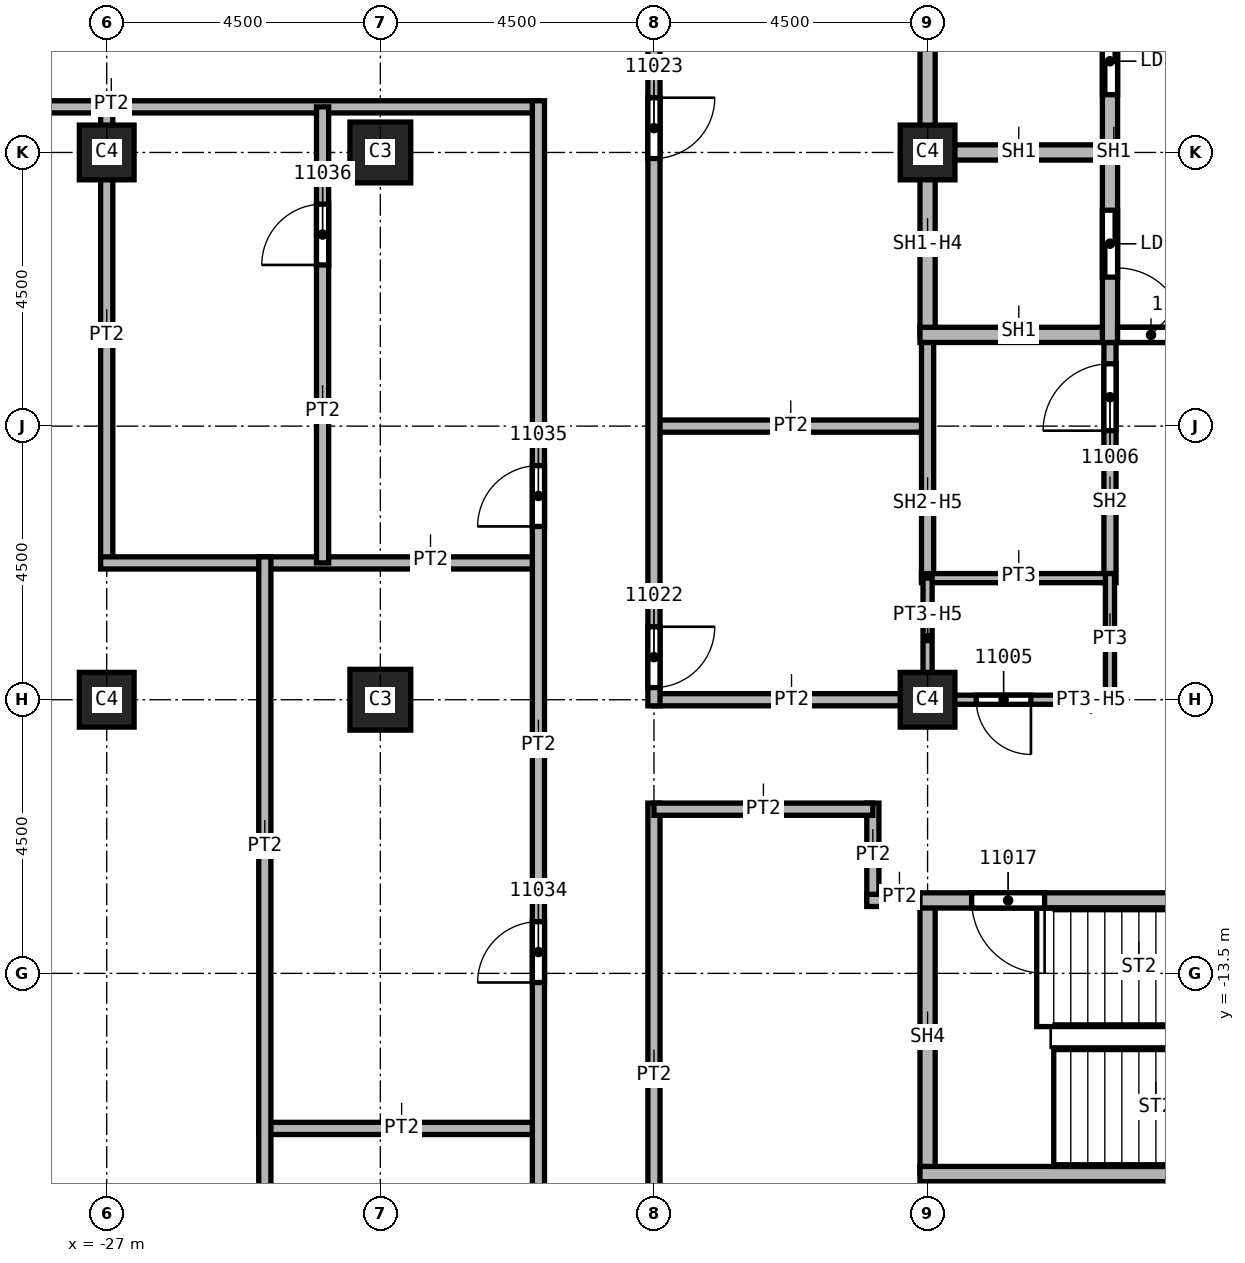
"""IFC4 building model, lengths in metres.
Left out: names, types, materials, properties, quantities, classifications, styles, units other than length and angle.
Written with IfcOpenShell. Run it as: python <this file> out.ifc"""

import sys

from ifc_helpers import new_model, si_unit, direction, frame, frame_2d, origin, origin_2d, place, context, subcontext, project, spatial, rectangle, extrude, element, fill, save


model = new_model("IFC4")
c1 = context("Model", 3, precision=1e-05, world=origin(), true_north=direction((0.0, 1.0)))
c2 = subcontext(c1, "Body", "Model", "MODEL_VIEW")
j1 = project(units=[si_unit("LENGTHUNIT", "METRE"), si_unit("PLANEANGLEUNIT", "RADIAN")], contexts=[c1])
p1 = place(None, origin())
s1 = spatial("IfcSite", under=j1, at=p1, CompositionType="ELEMENT")
p2 = place(p1, origin())
s2 = spatial("IfcBuilding", under=s1, at=p2, CompositionType="ELEMENT")
p3 = place(p2, frame((0.0, 0.0, 188.0)))
s3 = spatial("IfcBuildingStorey", under=s2, at=p3, CompositionType="ELEMENT", Elevation=188.0)
for number, where, z_axis, x_axis in (
    (1, (-22.5, 0.0, 0.0), (0.0, 0.0, 1.0), (1.0, 0.0, 0.0)),
    (2, (-22.5, -9.0, 0.0), (0.0, 0.0, 1.0), (1.0, 0.0, 0.0)),
):
    element("IfcColumn", number, at=place(p3, frame(where, z_axis=z_axis, x_axis=x_axis)), inside=s3, PredefinedType="COLUMN", context=c2, shape_type="SweptSolid", body=[
        extrude(rectangle(XDim=1.0, YDim=1.0, at=origin_2d()), origin(), (0.0, 0.0, 1.0), 3.72),
    ])
for number, where, z_axis, x_axis in (
    (3, (-13.5, 0.0, 0.0), (0.0, 0.0, 1.0), (1.0, 0.0, 0.0)),
    (4, (-13.5, -9.0, 0.0), (0.0, 0.0, 1.0), (1.0, 0.0, 0.0)),
    (5, (-27.0, 0.0, 0.0), (0.0, 0.0, 1.0), (1.0, 0.0, 0.0)),
    (6, (-27.0, -9.0, 0.0), (0.0, 0.0, 1.0), (1.0, 0.0, 0.0)),
):
    element("IfcColumn", number, at=place(p3, frame(where, z_axis=z_axis, x_axis=x_axis)), inside=s3, PredefinedType="COLUMN", context=c2, shape_type="SweptSolid", body=[
        extrude(rectangle(XDim=0.9, YDim=0.9, at=origin_2d()), origin(), (0.0, 0.0, 1.0), 3.72),
    ])
p4 = place(p3, frame((-27.0, -6.75, 0.0), z_axis=(0.0, 0.0, 1.0), x_axis=(0.0, 1.0, 0.0)))
e7 = element("IfcWall", 7, at=p4, inside=s3, PredefinedType="PARTITIONING", context=c2, shape_type="SweptSolid", body=[
    extrude(rectangle(XDim=7.5, YDim=0.2, at=frame_2d((3.75, 0.0))), origin(), (0.0, 0.0, 1.0), 3.72),
])
p5 = place(p3, frame((-19.9, 0.75, 0.0), z_axis=(0.0, 0.0, 1.0), x_axis=(-1.0, 0.0, 0.0)))
e8 = element("IfcWall", 8, at=p5, inside=s3, PredefinedType="PARTITIONING", context=c2, shape_type="SweptSolid", body=[
    extrude(rectangle(XDim=13.95, YDim=0.2, at=frame_2d((6.975, 0.0))), origin(), (0.0, 0.0, 1.0), 3.72),
])
p6 = place(p3, frame((-24.5, -16.05, 0.0), z_axis=(0.0, 0.0, 1.0), x_axis=(1.0, 0.0, 0.0)))
e9 = element("IfcWall", 9, at=p6, inside=s3, PredefinedType="PARTITIONING", context=c2, shape_type="SweptSolid", body=[
    extrude(rectangle(XDim=4.6, YDim=0.2, at=frame_2d((2.3, 0.0))), origin(), (0.0, 0.0, 1.0), 3.72),
])
p7 = place(p3, frame((-27.1, -6.75, 0.0), z_axis=(0.0, 0.0, 1.0), x_axis=(1.0, 0.0, 0.0)))
e10 = element("IfcWall", 10, at=p7, inside=s3, PredefinedType="PARTITIONING", context=c2, shape_type="SweptSolid", body=[
    extrude(rectangle(XDim=7.2, YDim=0.2, at=frame_2d((3.6, 0.0))), origin(), (0.0, 0.0, 1.0), 3.72),
])
p8 = place(p3, frame((-24.4, -17.5, 0.0), z_axis=(0.0, 0.0, 1.0), x_axis=(0.0, 1.0, 0.0)))
e11 = element("IfcWall", 11, at=p8, inside=s3, PredefinedType="PARTITIONING", context=c2, shape_type="SweptSolid", body=[
    extrude(rectangle(XDim=10.85, YDim=0.2, at=frame_2d((5.425, 0.0))), origin(), (0.0, 0.0, 1.0), 3.72),
])
p9 = place(p3, frame((-23.45, -6.75, 0.0), z_axis=(0.0, 0.0, 1.0), x_axis=(0.0, 1.0, 0.0)))
e12 = element("IfcWall", 12, at=p9, inside=s3, PredefinedType="PARTITIONING", context=c2, shape_type="SweptSolid", body=[
    extrude(rectangle(XDim=7.5, YDim=0.2, at=frame_2d((3.75, 0.0))), origin(), (0.0, 0.0, 1.0), 3.72),
])
p10 = place(p9, frame((4.9, 0.0, 0.0)))
e13 = element("IfcOpeningElement", 13, at=p10, cuts=e12, PredefinedType="OPENING", context=c2, shape_type="SweptSolid", body=[
    extrude(rectangle(XDim=1.0, YDim=2.1, at=frame_2d((0.5, 1.05))), frame((0.0, 0.1, 0.0), z_axis=(0.0, -1.0, 0.0), x_axis=(1.0, 0.0, 0.0)), (0.0, 0.0, 1.0), 0.2),
])
p11 = place(p3, frame((-19.9, -22.4, 0.0), z_axis=(0.0, 0.0, 1.0), x_axis=(0.0, 1.0, 0.0)))
e14 = element("IfcWall", 14, at=p11, inside=s3, PredefinedType="PARTITIONING", context=c2, shape_type="SweptSolid", body=[
    extrude(rectangle(XDim=23.25, YDim=0.2, at=frame_2d((11.625, 0.0))), origin(), (0.0, 0.0, 1.0), 3.72),
])
p12 = place(p11, frame((1.9, 0.0, 0.0)))
e15 = element("IfcOpeningElement", 15, at=p12, cuts=e14, PredefinedType="OPENING", context=c2, shape_type="SweptSolid", body=[
    extrude(rectangle(XDim=1.0, YDim=2.1, at=frame_2d((0.5, 1.05))), frame((0.0, 0.1, 0.0), z_axis=(0.0, -1.0, 0.0), x_axis=(1.0, 0.0, 0.0)), (0.0, 0.0, 1.0), 0.2),
])
p13 = place(p11, frame((8.75, 0.0, 0.0)))
e16 = element("IfcOpeningElement", 16, at=p13, cuts=e14, PredefinedType="OPENING", context=c2, shape_type="SweptSolid", body=[
    extrude(rectangle(XDim=1.0, YDim=2.1, at=frame_2d((0.5, 1.05))), frame((0.0, 0.1, 0.0), z_axis=(0.0, -1.0, 0.0), x_axis=(1.0, 0.0, 0.0)), (0.0, 0.0, 1.0), 0.2),
])
p14 = place(p11, frame((16.25, 0.0, 0.0)))
e17 = element("IfcOpeningElement", 17, at=p14, cuts=e14, PredefinedType="OPENING", context=c2, shape_type="SweptSolid", body=[
    extrude(rectangle(XDim=1.0, YDim=2.1, at=frame_2d((0.5, 1.05))), frame((0.0, 0.1, 0.0), z_axis=(0.0, -1.0, 0.0), x_axis=(1.0, 0.0, 0.0)), (0.0, 0.0, 1.0), 0.2),
])
p15 = place(p3, frame((-18.0, -10.7, 0.0), z_axis=(0.0, 0.0, 1.0), x_axis=(0.0, -1.0, 0.0)))
e18 = element("IfcWall", 18, at=p15, inside=s3, PredefinedType="PARTITIONING", context=c2, shape_type="SweptSolid", body=[
    extrude(rectangle(XDim=11.6, YDim=0.2, at=frame_2d((5.8, 0.0))), origin(), (0.0, 0.0, 1.0), 3.72),
])
p16 = place(p15, frame((8.75, 0.0, 0.0)))
e19 = element("IfcOpeningElement", 19, at=p16, cuts=e18, PredefinedType="OPENING", context=c2, shape_type="SweptSolid", body=[
    extrude(rectangle(XDim=1.0, YDim=2.1, at=frame_2d((0.5, 1.05))), frame((0.0, 0.1, 0.0), z_axis=(0.0, -1.0, 0.0), x_axis=(1.0, 0.0, 0.0)), (0.0, 0.0, 1.0), 0.2),
])
for number, where, z_axis, x_axis in (
    (20, (-18.0, -9.0, 0.0), (0.0, 0.0, 1.0), (1.0, 0.0, 0.0)),
    (21, (-18.0, -4.5, 0.0), (0.0, 0.0, 1.0), (1.0, 0.0, 0.0)),
):
    element("IfcWall", number, at=place(p3, frame(where, z_axis=z_axis, x_axis=x_axis)), inside=s3, PredefinedType="PARTITIONING", context=c2, shape_type="SweptSolid", body=[
        extrude(rectangle(XDim=4.5, YDim=0.2, at=frame_2d((2.25, 0.0))), origin(), (0.0, 0.0, 1.0), 3.72),
    ])
p17 = place(p3, frame((-18.0, 9.1, 0.0), z_axis=(0.0, 0.0, 1.0), x_axis=(0.0, -1.0, 0.0)))
e22 = element("IfcWall", 22, at=p17, inside=s3, PredefinedType="PARTITIONING", context=c2, shape_type="SweptSolid", body=[
    extrude(rectangle(XDim=18.2, YDim=0.2, at=frame_2d((9.1, 0.0))), origin(), (0.0, 0.0, 1.0), 3.72),
])
p18 = place(p17, frame((16.9, 0.0, 0.0)))
e23 = element("IfcOpeningElement", 23, at=p18, cuts=e22, PredefinedType="OPENING", context=c2, shape_type="SweptSolid", body=[
    extrude(rectangle(XDim=1.0, YDim=2.1, at=frame_2d((0.5, 1.05))), frame((0.0, 0.1, 0.0), z_axis=(0.0, -1.0, 0.0), x_axis=(1.0, 0.0, 0.0)), (0.0, 0.0, 1.0), 0.2),
])
p19 = place(p17, frame((8.2, 0.0, 0.0)))
e24 = element("IfcOpeningElement", 24, at=p19, cuts=e22, PredefinedType="OPENING", context=c2, shape_type="SweptSolid", body=[
    extrude(rectangle(XDim=1.0, YDim=2.1, at=frame_2d((0.5, 1.05))), frame((0.0, 0.1, 0.0), z_axis=(0.0, -1.0, 0.0), x_axis=(1.0, 0.0, 0.0)), (0.0, 0.0, 1.0), 0.2),
])
p20 = place(p3, frame((-14.4, -12.3, 0.0), z_axis=(0.0, 0.0, 1.0), x_axis=(0.0, 1.0, 0.0)))
e25 = element("IfcWall", 25, at=p20, inside=s3, PredefinedType="PARTITIONING", context=c2, shape_type="SweptSolid", body=[
    extrude(rectangle(XDim=1.6, YDim=0.2, at=frame_2d((0.8, 0.0))), origin(), (0.0, 0.0, 1.0), 3.72),
])
p21 = place(p3, frame((-14.4, -10.8, 0.0), z_axis=(0.0, 0.0, 1.0), x_axis=(-1.0, 0.0, 0.0)))
e26 = element("IfcWall", 26, at=p21, inside=s3, PredefinedType="PARTITIONING", context=c2, shape_type="SweptSolid", body=[
    extrude(rectangle(XDim=3.6, YDim=0.2, at=frame_2d((1.8, 0.0))), origin(), (0.0, 0.0, 1.0), 3.72),
])
p22 = place(p3, frame((-13.375, -12.3, 0.0), z_axis=(0.0, 0.0, 1.0), x_axis=(-1.0, 0.0, 0.0)))
e27 = element("IfcWall", 27, at=p22, inside=s3, PredefinedType="PARTITIONING", context=c2, shape_type="SweptSolid", body=[
    extrude(rectangle(XDim=1.125, YDim=0.2, at=frame_2d((0.562, 0.0))), origin(), (0.0, 0.0, 1.0), 3.72),
])
p23 = place(p3, frame((-13.5, -7.0, 0.0), z_axis=(0.0, 0.0, 1.0), x_axis=(0.0, 1.0, 0.0)))
e28 = element("IfcWall", 28, at=p23, inside=s3, PredefinedType="SOLIDWALL", context=c2, shape_type="SweptSolid", body=[
    extrude(rectangle(XDim=4.0, YDim=0.2, at=frame_2d((2.0, 0.0))), origin(), (0.0, 0.0, 1.0), 2.958),
])
p24 = place(p3, frame((-10.5, -7.075, 0.0), z_axis=(0.0, 0.0, 1.0), x_axis=(0.0, 1.0, 0.0)))
e29 = element("IfcWall", 29, at=p24, inside=s3, PredefinedType="SOLIDWALL", context=c2, shape_type="SweptSolid", body=[
    extrude(rectangle(XDim=4.2, YDim=0.2, at=frame_2d((2.1, 0.0))), origin(), (0.0, 0.0, 1.0), 3.72),
])
p25 = place(p24, frame((2.5, 0.0, 0.0)))
e30 = element("IfcOpeningElement", 30, at=p25, cuts=e29, PredefinedType="OPENING", context=c2, shape_type="SweptSolid", body=[
    extrude(rectangle(XDim=1.1, YDim=2.1, at=frame_2d((0.55, 1.05))), frame((0.0, 0.1, 0.0), z_axis=(0.0, -1.0, 0.0), x_axis=(1.0, 0.0, 0.0)), (0.0, 0.0, 1.0), 0.2),
])
p26 = place(p3, frame((-13.625, 0.0, 0.0), z_axis=(0.0, 0.0, 1.0), x_axis=(1.0, 0.0, 0.0)))
e31 = element("IfcWall", 31, at=p26, inside=s3, PredefinedType="SOLIDWALL", context=c2, shape_type="SweptSolid", body=[
    extrude(rectangle(XDim=3.125, YDim=0.25, at=frame_2d((1.562, 0.0))), origin(), (0.0, 0.0, 1.0), 3.72),
])
p27 = place(p3, frame((-13.5, -3.0, 0.0), z_axis=(0.0, 0.0, 1.0), x_axis=(0.0, 1.0, 0.0)))
e32 = element("IfcWall", 32, at=p27, inside=s3, PredefinedType="SOLIDWALL", context=c2, shape_type="SweptSolid", body=[
    extrude(rectangle(XDim=6.0, YDim=0.25, at=frame_2d((3.0, 0.0))), origin(), (0.0, 0.0, 1.0), 2.958),
])
p28 = place(p3, frame((-13.625, -3.0, 0.0), z_axis=(0.0, 0.0, 1.0), x_axis=(1.0, 0.0, 0.0)))
e33 = element("IfcWall", 33, at=p28, inside=s3, PredefinedType="SOLIDWALL", context=c2, shape_type="SweptSolid", body=[
    extrude(rectangle(XDim=6.125, YDim=0.25, at=frame_2d((3.062, 0.0))), origin(), (0.0, 0.0, 1.0), 3.72),
])
p29 = place(p28, frame((3.25, 0.0, 0.0)))
e34 = element("IfcOpeningElement", 34, at=p29, cuts=e33, PredefinedType="OPENING", context=c2, shape_type="SweptSolid", body=[
    extrude(rectangle(XDim=1.1, YDim=2.1, at=frame_2d((0.55, 1.05))), frame((0.0, 0.125, 0.0), z_axis=(0.0, -1.0, 0.0), x_axis=(1.0, 0.0, 0.0)), (0.0, 0.0, 1.0), 0.25),
])
p30 = place(p3, frame((-10.5, -3.125, 0.0), z_axis=(0.0, 0.0, 1.0), x_axis=(0.0, 1.0, 0.0)))
e35 = element("IfcWall", 35, at=p30, inside=s3, PredefinedType="SOLIDWALL", context=c2, shape_type="SweptSolid", body=[
    extrude(rectangle(XDim=6.25, YDim=0.25, at=frame_2d((3.125, 0.0))), origin(), (0.0, 0.0, 1.0), 3.72),
])
p31 = place(p30, frame((1.075, 0.0, 0.0)))
e36 = element("IfcOpeningElement", 36, at=p31, cuts=e35, PredefinedType="OPENING", context=c2, shape_type="SweptSolid", body=[
    extrude(rectangle(XDim=1.1, YDim=2.1, at=frame_2d((0.55, 1.05))), frame((0.0, 0.125, 0.0), z_axis=(0.0, -1.0, 0.0), x_axis=(1.0, 0.0, 0.0)), (0.0, 0.0, 1.0), 0.25),
])
p32 = place(p30, frame((4.075, 0.0, 0.0)))
e37 = element("IfcOpeningElement", 37, at=p32, cuts=e35, PredefinedType="OPENING", context=c2, shape_type="SweptSolid", body=[
    extrude(rectangle(XDim=1.1, YDim=2.1, at=frame_2d((0.55, 1.05))), frame((0.0, 0.125, 0.0), z_axis=(0.0, -1.0, 0.0), x_axis=(1.0, 0.0, 0.0)), (0.0, 0.0, 1.0), 0.25),
])
p33 = place(p3, frame((-13.5, -16.8, 0.0), z_axis=(0.0, 0.0, 1.0), x_axis=(0.0, 1.0, 0.0)))
e38 = element("IfcWall", 38, at=p33, inside=s3, PredefinedType="SOLIDWALL", context=c2, shape_type="SweptSolid", body=[
    extrude(rectangle(XDim=4.5, YDim=0.25, at=frame_2d((2.25, 0.0))), origin(), (0.0, 0.0, 1.0), 3.72),
])
p34 = place(p3, frame((-4.5, -16.8, 0.0), z_axis=(0.0, 0.0, 1.0), x_axis=(-1.0, 0.0, 0.0)))
e39 = element("IfcWall", 39, at=p34, inside=s3, PredefinedType="SOLIDWALL", context=c2, shape_type="SweptSolid", body=[
    extrude(rectangle(XDim=9.125, YDim=0.25, at=frame_2d((4.562, 0.0))), origin(), (0.0, 0.0, 1.0), 3.72),
])
p35 = place(p3, frame((-4.375, -12.3, 0.0), z_axis=(0.0, 0.0, 1.0), x_axis=(-1.0, 0.0, 0.0)))
e40 = element("IfcWall", 40, at=p35, inside=s3, PredefinedType="SOLIDWALL", context=c2, shape_type="SweptSolid", body=[
    extrude(rectangle(XDim=9.25, YDim=0.25, at=frame_2d((4.625, 0.0))), origin(), (0.0, 0.0, 1.0), 3.72),
])
p36 = place(p35, frame((7.2, 0.0, 0.0)))
e41 = element("IfcOpeningElement", 41, at=p36, cuts=e40, PredefinedType="OPENING", context=c2, shape_type="SweptSolid", body=[
    extrude(rectangle(XDim=1.2, YDim=2.1, at=frame_2d((0.6, 1.05))), frame((0.0, 0.125, 0.0), z_axis=(0.0, -1.0, 0.0), x_axis=(1.0, 0.0, 0.0)), (0.0, 0.0, 1.0), 0.25),
])
p37 = place(p3, frame((-13.6, -7.0, 0.0), z_axis=(0.0, 0.0, 1.0), x_axis=(1.0, 0.0, 0.0)))
e42 = element("IfcWall", 42, at=p37, inside=s3, PredefinedType="PARTITIONING", context=c2, shape_type="SweptSolid", body=[
    extrude(rectangle(XDim=3.1, YDim=0.15, at=frame_2d((1.55, 0.0))), origin(), (0.0, 0.0, 1.0), 3.72),
])
p38 = place(p3, frame((-13.5, -9.1, 0.0), z_axis=(0.0, 0.0, 1.0), x_axis=(0.0, 1.0, 0.0)))
e43 = element("IfcWall", 43, at=p38, inside=s3, PredefinedType="PARTITIONING", context=c2, shape_type="SweptSolid", body=[
    extrude(rectangle(XDim=2.1, YDim=0.15, at=frame_2d((1.05, 0.0))), origin(), (0.0, 0.0, 1.0), 2.958),
])
p39 = place(p3, frame((-10.5, -9.075, 0.0), z_axis=(0.0, 0.0, 1.0), x_axis=(0.0, 1.0, 0.0)))
e44 = element("IfcWall", 44, at=p39, inside=s3, PredefinedType="PARTITIONING", context=c2, shape_type="SweptSolid", body=[
    extrude(rectangle(XDim=2.15, YDim=0.15, at=frame_2d((1.075, 0.0))), origin(), (0.0, 0.0, 1.0), 3.72),
])
p40 = place(p3, frame((-10.5, -9.0, 0.0), z_axis=(0.0, 0.0, 1.0), x_axis=(-1.0, 0.0, 0.0)))
e45 = element("IfcWall", 45, at=p40, inside=s3, PredefinedType="PARTITIONING", context=c2, shape_type="SweptSolid", body=[
    extrude(rectangle(XDim=3.075, YDim=0.15, at=frame_2d((1.538, 0.0))), origin(), (0.0, 0.0, 1.0), 2.958),
])
p41 = place(p40, frame((1.3, 0.0, 0.0)))
e46 = element("IfcOpeningElement", 46, at=p41, cuts=e45, PredefinedType="OPENING", context=c2, shape_type="SweptSolid", body=[
    extrude(rectangle(XDim=0.9, YDim=2.1, at=frame_2d((0.45, 1.05))), frame((0.0, 0.075, 0.0), z_axis=(0.0, -1.0, 0.0), x_axis=(1.0, 0.0, 0.0)), (0.0, 0.0, 1.0), 0.15),
])
p42 = place(p29, origin())
e47 = element("IfcDoor", 47, at=p42, inside=s3, OperationType="SINGLE_SWING_RIGHT", PredefinedType="DOOR", context=c2, shape_type="SweptSolid", body=[
    extrude(rectangle(XDim=1.1, YDim=2.1, at=frame_2d((0.55, 1.05))), frame((0.0, 0.025, 0.0), z_axis=(0.0, -1.0, 0.0), x_axis=(1.0, 0.0, 0.0)), (0.0, 0.0, 1.0), 0.05),
])
fill(e34, e47)
p43 = place(p41, origin())
e48 = element("IfcDoor", 48, at=p43, inside=s3, OperationType="SINGLE_SWING_RIGHT", PredefinedType="DOOR", context=c2, shape_type="SweptSolid", body=[
    extrude(rectangle(XDim=0.9, YDim=2.1, at=frame_2d((0.45, 1.05))), frame((0.0, 0.025, 0.0), z_axis=(0.0, -1.0, 0.0), x_axis=(1.0, 0.0, 0.0)), (0.0, 0.0, 1.0), 0.05),
])
fill(e46, e48)
p44 = place(p25, origin())
e49 = element("IfcDoor", 49, at=p44, inside=s3, OperationType="SINGLE_SWING_LEFT", PredefinedType="DOOR", context=c2, shape_type="SweptSolid", body=[
    extrude(rectangle(XDim=1.1, YDim=2.1, at=frame_2d((0.55, 1.05))), frame((0.0, 0.025, 0.0), z_axis=(0.0, -1.0, 0.0), x_axis=(1.0, 0.0, 0.0)), (0.0, 0.0, 1.0), 0.05),
])
fill(e30, e49)
p45 = place(p36, origin())
e50 = element("IfcDoor", 50, at=p45, inside=s3, OperationType="SINGLE_SWING_RIGHT", PredefinedType="DOOR", context=c2, shape_type="SweptSolid", body=[
    extrude(rectangle(XDim=1.2, YDim=2.1, at=frame_2d((0.6, 1.05))), frame((0.0, 0.025, 0.0), z_axis=(0.0, -1.0, 0.0), x_axis=(1.0, 0.0, 0.0)), (0.0, 0.0, 1.0), 0.05),
])
fill(e41, e50)
p46 = place(p18, origin())
e51 = element("IfcDoor", 51, at=p46, inside=s3, OperationType="SINGLE_SWING_LEFT", PredefinedType="DOOR", context=c2, shape_type="SweptSolid", body=[
    extrude(rectangle(XDim=1.0, YDim=2.1, at=frame_2d((0.5, 1.05))), frame((0.0, 0.025, 0.0), z_axis=(0.0, -1.0, 0.0), x_axis=(1.0, 0.0, 0.0)), (0.0, 0.0, 1.0), 0.05),
])
fill(e23, e51)
p47 = place(p19, origin())
e52 = element("IfcDoor", 52, at=p47, inside=s3, OperationType="SINGLE_SWING_RIGHT", PredefinedType="DOOR", context=c2, shape_type="SweptSolid", body=[
    extrude(rectangle(XDim=1.0, YDim=2.1, at=frame_2d((0.5, 1.05))), frame((0.0, 0.025, 0.0), z_axis=(0.0, -1.0, 0.0), x_axis=(1.0, 0.0, 0.0)), (0.0, 0.0, 1.0), 0.05),
])
fill(e24, e52)
p48 = place(p13, origin())
e53 = element("IfcDoor", 53, at=p48, inside=s3, OperationType="SINGLE_SWING_LEFT", PredefinedType="DOOR", context=c2, shape_type="SweptSolid", body=[
    extrude(rectangle(XDim=1.0, YDim=2.1, at=frame_2d((0.5, 1.05))), frame((0.0, 0.025, 0.0), z_axis=(0.0, -1.0, 0.0), x_axis=(1.0, 0.0, 0.0)), (0.0, 0.0, 1.0), 0.05),
])
fill(e16, e53)
p49 = place(p14, origin())
e54 = element("IfcDoor", 54, at=p49, inside=s3, OperationType="SINGLE_SWING_RIGHT", PredefinedType="DOOR", context=c2, shape_type="SweptSolid", body=[
    extrude(rectangle(XDim=1.0, YDim=2.1, at=frame_2d((0.5, 1.05))), frame((0.0, 0.025, 0.0), z_axis=(0.0, -1.0, 0.0), x_axis=(1.0, 0.0, 0.0)), (0.0, 0.0, 1.0), 0.05),
])
fill(e17, e54)
p50 = place(p10, origin())
e55 = element("IfcDoor", 55, at=p50, inside=s3, OperationType="SINGLE_SWING_LEFT", PredefinedType="DOOR", context=c2, shape_type="SweptSolid", body=[
    extrude(rectangle(XDim=1.0, YDim=2.1, at=frame_2d((0.5, 1.05))), frame((0.0, 0.025, 0.0), z_axis=(0.0, -1.0, 0.0), x_axis=(1.0, 0.0, 0.0)), (0.0, 0.0, 1.0), 0.05),
])
fill(e13, e55)
p51 = place(p31, origin())
e56 = element("IfcDoor", 56, at=p51, inside=s3, OperationType="SLIDING_TO_LEFT", PredefinedType="DOOR", context=c2, shape_type="SweptSolid", body=[
    extrude(rectangle(XDim=1.1, YDim=2.1, at=frame_2d((0.55, 1.05))), frame((0.0, 0.025, 0.0), z_axis=(0.0, -1.0, 0.0), x_axis=(1.0, 0.0, 0.0)), (0.0, 0.0, 1.0), 0.05),
])
fill(e36, e56)
p52 = place(p32, origin())
e57 = element("IfcDoor", 57, at=p52, inside=s3, OperationType="SLIDING_TO_LEFT", PredefinedType="DOOR", context=c2, shape_type="SweptSolid", body=[
    extrude(rectangle(XDim=1.1, YDim=2.1, at=frame_2d((0.55, 1.05))), frame((0.0, 0.025, 0.0), z_axis=(0.0, -1.0, 0.0), x_axis=(1.0, 0.0, 0.0)), (0.0, 0.0, 1.0), 0.05),
])
fill(e37, e57)
save(model, sys.argv[1])
